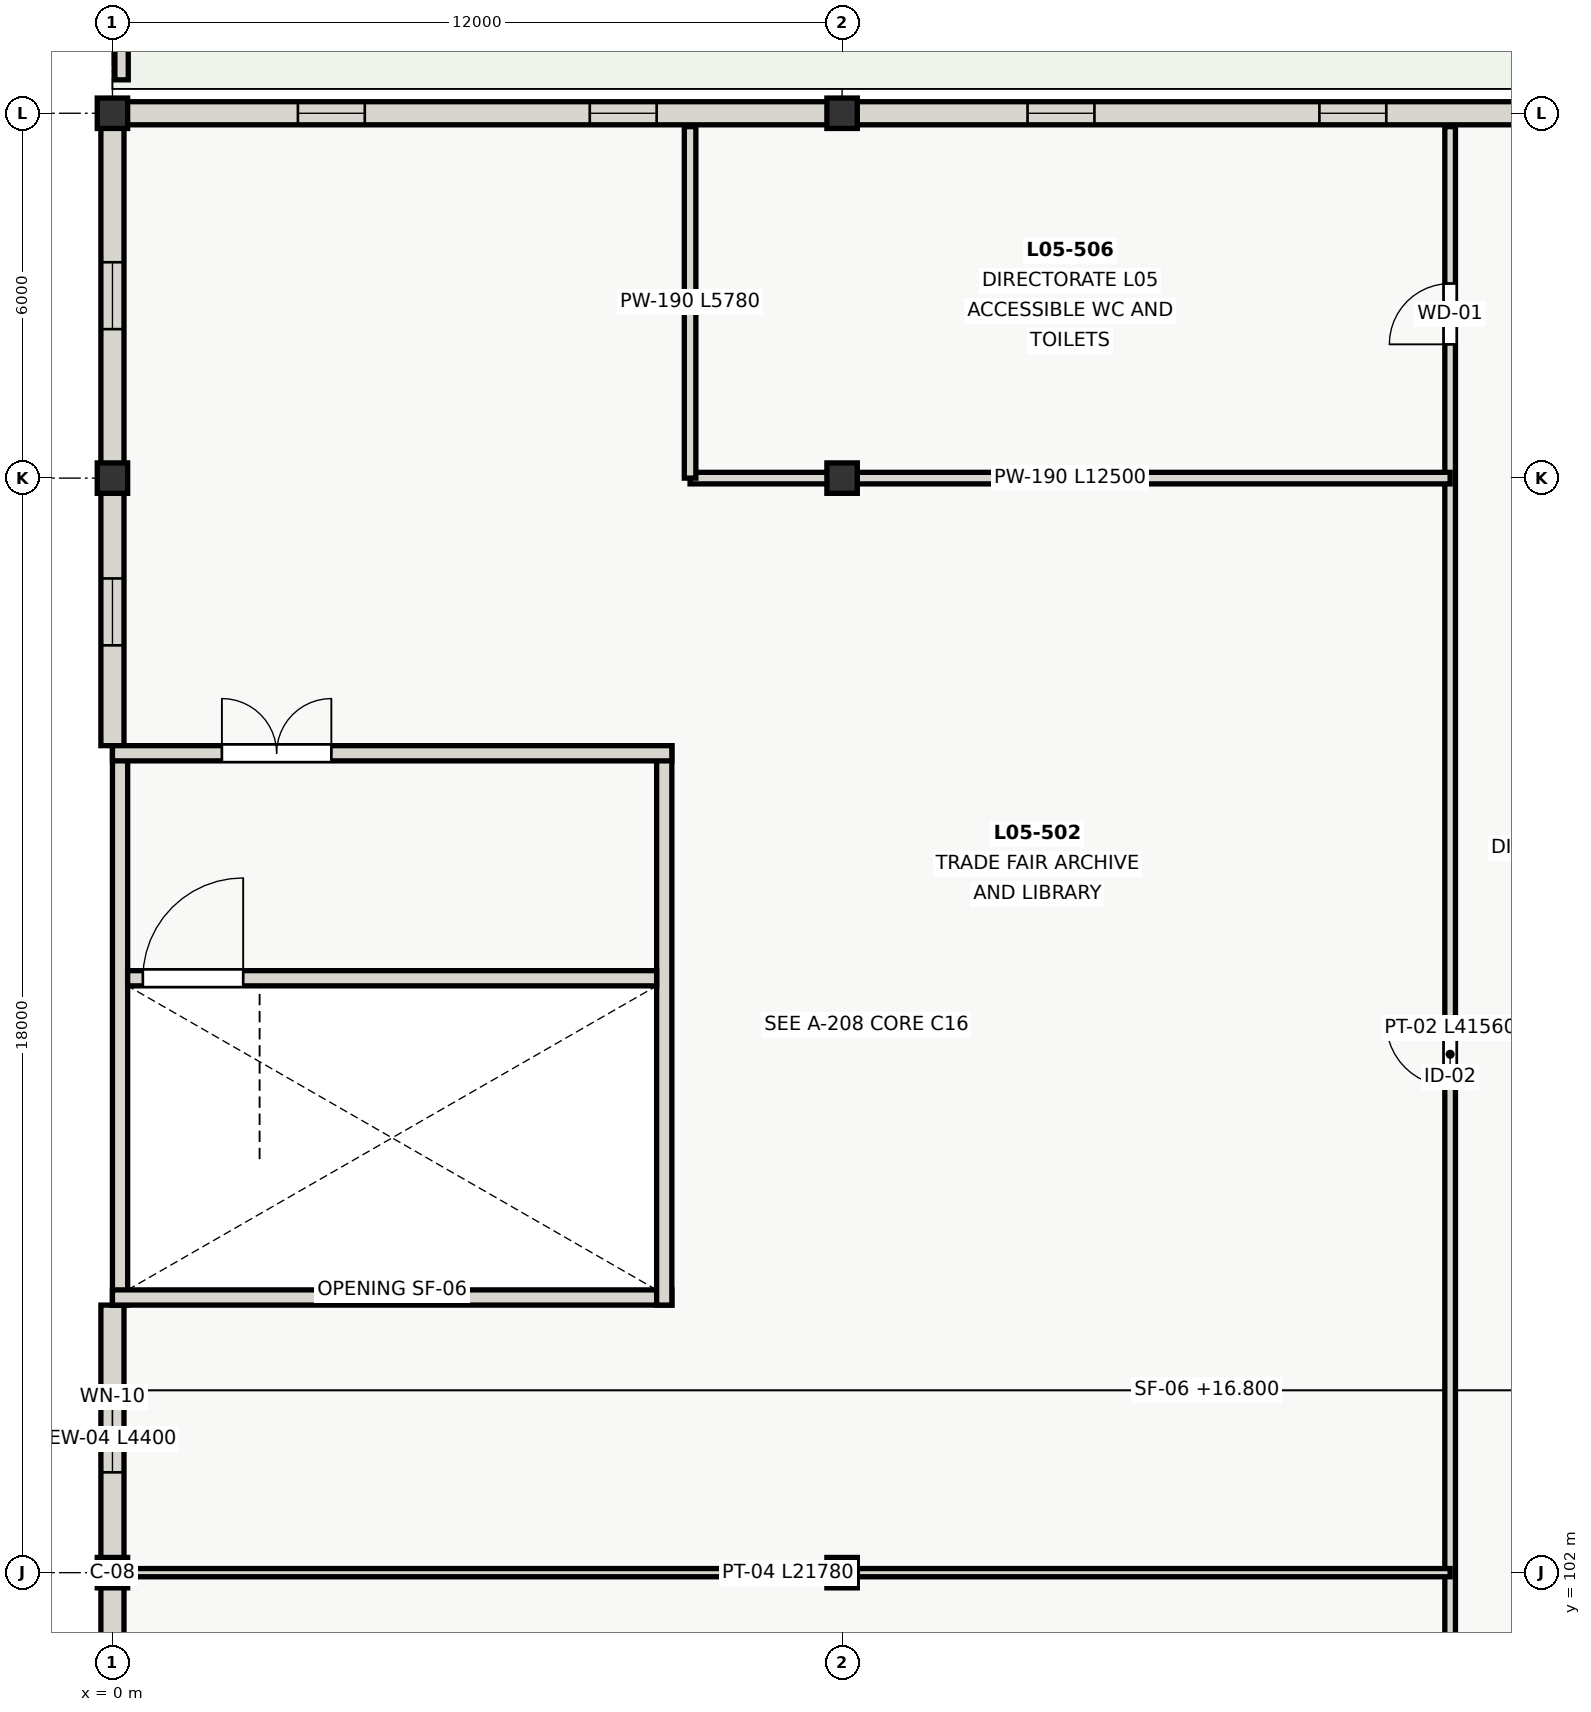
"""IFC4 building model, lengths in metres.
Left out: names, types, materials, properties, quantities, classifications, styles, units other than length and angle.
Written with IfcOpenShell. Run it as: python <this file> out.ifc"""

import sys

from ifc_helpers import new_model, si_unit, direction, frame, frame_2d, origin, origin_2d, place, context, subcontext, project, spatial, rectangle, extrude, element, fill, save


model = new_model("IFC4")
c1 = context("Model", 3, precision=1e-05, world=origin(), true_north=direction((0.0, 1.0)))
c2 = subcontext(c1, "Body", "Model", "MODEL_VIEW")
j1 = project(units=[si_unit("LENGTHUNIT", "METRE"), si_unit("PLANEANGLEUNIT", "RADIAN")], contexts=[c1])
p1 = place(None, origin())
s1 = spatial("IfcSite", under=j1, at=p1, CompositionType="ELEMENT")
p2 = place(p1, origin())
s2 = spatial("IfcBuilding", under=s1, at=p2, CompositionType="ELEMENT")
p3 = place(p2, frame((0.0, 0.0, 16.8)))
s3 = spatial("IfcBuildingStorey", under=s2, at=p3, CompositionType="ELEMENT", Elevation=16.8)
for number, where, z_axis, x_axis in (
    (1, (0.0, 102.0, 0.0), (0.0, 0.0, 1.0), (1.0, 0.0, 0.0)),
    (2, (12.0, 102.0, 0.0), (0.0, 0.0, 1.0), (1.0, 0.0, 0.0)),
    (3, (0.0, 120.0, 0.0), (0.0, 0.0, 1.0), (1.0, 0.0, 0.0)),
    (4, (12.0, 120.0, 0.0), (0.0, 0.0, 1.0), (1.0, 0.0, 0.0)),
    (5, (0.0, 126.0, 0.0), (0.0, 0.0, 1.0), (1.0, 0.0, 0.0)),
    (6, (12.0, 126.0, 0.0), (0.0, 0.0, 1.0), (1.0, 0.0, 0.0)),
):
    element("IfcColumn", number, at=place(p3, frame(where, z_axis=z_axis, x_axis=x_axis)), inside=s3, PredefinedType="COLUMN", context=c2, shape_type="SweptSolid", body=[
        extrude(rectangle(XDim=0.5, YDim=0.5, at=origin_2d()), origin(), (0.0, 0.0, 1.0), 4.2),
    ])
p4 = place(p3, frame((0.0, 97.6, 0.0), z_axis=(0.0, 0.0, 1.0), x_axis=(0.0, 1.0, 0.0)))
e7 = element("IfcWall", 7, at=p4, inside=s3, PredefinedType="SOLIDWALL", context=c2, shape_type="SweptSolid", body=[
    extrude(rectangle(XDim=4.4, YDim=0.38, at=frame_2d((2.2, 0.0))), origin(), (0.0, 0.0, 1.0), 3.525),
])
p5 = place(p4, frame((1.65, 0.0, 0.9)))
e8 = element("IfcOpeningElement", 8, at=p5, cuts=e7, PredefinedType="OPENING", context=c2, shape_type="SweptSolid", body=[
    extrude(rectangle(XDim=1.1, YDim=1.55, at=frame_2d((0.55, 0.775))), frame((0.0, 0.2, 0.0), z_axis=(0.0, -1.0, 0.0), x_axis=(1.0, 0.0, 0.0)), (0.0, 0.0, 1.0), 0.4),
])
p6 = place(p3, frame((0.0, 102.0, 0.0), z_axis=(0.0, 0.0, 1.0), x_axis=(0.0, 1.0, 0.0)))
e9 = element("IfcWall", 9, at=p6, inside=s3, PredefinedType="SOLIDWALL", context=c2, shape_type="SweptSolid", body=[
    extrude(rectangle(XDim=4.4, YDim=0.38, at=frame_2d((2.2, 0.0))), origin(), (0.0, 0.0, 1.0), 3.525),
])
p7 = place(p6, frame((1.65, 0.0, 0.9)))
e10 = element("IfcOpeningElement", 10, at=p7, cuts=e9, PredefinedType="OPENING", context=c2, shape_type="SweptSolid", body=[
    extrude(rectangle(XDim=1.1, YDim=1.55, at=frame_2d((0.55, 0.775))), frame((0.0, 0.2, 0.0), z_axis=(0.0, -1.0, 0.0), x_axis=(1.0, 0.0, 0.0)), (0.0, 0.0, 1.0), 0.4),
])
p8 = place(p3, frame((0.0, 115.6, 0.0), z_axis=(0.0, 0.0, 1.0), x_axis=(0.0, 1.0, 0.0)))
e11 = element("IfcWall", 11, at=p8, inside=s3, PredefinedType="SOLIDWALL", context=c2, shape_type="SweptSolid", body=[
    extrude(rectangle(XDim=4.4, YDim=0.38, at=frame_2d((2.2, 0.0))), origin(), (0.0, 0.0, 1.0), 3.525),
])
p9 = place(p8, frame((1.65, 0.0, 0.9)))
e12 = element("IfcOpeningElement", 12, at=p9, cuts=e11, PredefinedType="OPENING", context=c2, shape_type="SweptSolid", body=[
    extrude(rectangle(XDim=1.1, YDim=1.55, at=frame_2d((0.55, 0.775))), frame((0.0, 0.2, 0.0), z_axis=(0.0, -1.0, 0.0), x_axis=(1.0, 0.0, 0.0)), (0.0, 0.0, 1.0), 0.4),
])
p10 = place(p3, frame((0.0, 120.0, 0.0), z_axis=(0.0, 0.0, 1.0), x_axis=(0.0, 1.0, 0.0)))
e13 = element("IfcWall", 13, at=p10, inside=s3, PredefinedType="SOLIDWALL", context=c2, shape_type="SweptSolid", body=[
    extrude(rectangle(XDim=6.0, YDim=0.38, at=frame_2d((3.0, 0.0))), origin(), (0.0, 0.0, 1.0), 3.525),
])
p11 = place(p10, frame((2.45, 0.0, 0.9)))
e14 = element("IfcOpeningElement", 14, at=p11, cuts=e13, PredefinedType="OPENING", context=c2, shape_type="SweptSolid", body=[
    extrude(rectangle(XDim=1.1, YDim=1.55, at=frame_2d((0.55, 0.775))), frame((0.0, 0.2, 0.0), z_axis=(0.0, -1.0, 0.0), x_axis=(1.0, 0.0, 0.0)), (0.0, 0.0, 1.0), 0.4),
])
p12 = place(p3, frame((0.0, 126.0, 0.0), z_axis=(0.0, 0.0, 1.0), x_axis=(1.0, 0.0, 0.0)))
e15 = element("IfcWall", 15, at=p12, inside=s3, PredefinedType="SOLIDWALL", context=c2, shape_type="SweptSolid", body=[
    extrude(rectangle(XDim=12.0, YDim=0.38, at=frame_2d((6.0, 0.0))), origin(), (0.0, 0.0, 1.0), 3.555),
])
p13 = place(p12, frame((3.05, 0.0, 0.9)))
e16 = element("IfcOpeningElement", 16, at=p13, cuts=e15, PredefinedType="OPENING", context=c2, shape_type="SweptSolid", body=[
    extrude(rectangle(XDim=1.1, YDim=1.55, at=frame_2d((0.55, 0.775))), frame((0.0, 0.2, 0.0), z_axis=(0.0, -1.0, 0.0), x_axis=(1.0, 0.0, 0.0)), (0.0, 0.0, 1.0), 0.4),
])
p14 = place(p12, frame((7.85, 0.0, 0.9)))
e17 = element("IfcOpeningElement", 17, at=p14, cuts=e15, PredefinedType="OPENING", context=c2, shape_type="SweptSolid", body=[
    extrude(rectangle(XDim=1.1, YDim=1.55, at=frame_2d((0.55, 0.775))), frame((0.0, 0.2, 0.0), z_axis=(0.0, -1.0, 0.0), x_axis=(1.0, 0.0, 0.0)), (0.0, 0.0, 1.0), 0.4),
])
p15 = place(p3, frame((12.0, 126.0, 0.0), z_axis=(0.0, 0.0, 1.0), x_axis=(1.0, 0.0, 0.0)))
e18 = element("IfcWall", 18, at=p15, inside=s3, PredefinedType="SOLIDWALL", context=c2, shape_type="SweptSolid", body=[
    extrude(rectangle(XDim=12.0, YDim=0.38, at=frame_2d((6.0, 0.0))), origin(), (0.0, 0.0, 1.0), 3.555),
])
p16 = place(p15, frame((3.05, 0.0, 0.9)))
e19 = element("IfcOpeningElement", 19, at=p16, cuts=e18, PredefinedType="OPENING", context=c2, shape_type="SweptSolid", body=[
    extrude(rectangle(XDim=1.1, YDim=1.55, at=frame_2d((0.55, 0.775))), frame((0.0, 0.2, 0.0), z_axis=(0.0, -1.0, 0.0), x_axis=(1.0, 0.0, 0.0)), (0.0, 0.0, 1.0), 0.4),
])
p17 = place(p15, frame((7.85, 0.0, 0.9)))
e20 = element("IfcOpeningElement", 20, at=p17, cuts=e18, PredefinedType="OPENING", context=c2, shape_type="SweptSolid", body=[
    extrude(rectangle(XDim=1.1, YDim=1.55, at=frame_2d((0.55, 0.775))), frame((0.0, 0.2, 0.0), z_axis=(0.0, -1.0, 0.0), x_axis=(1.0, 0.0, 0.0)), (0.0, 0.0, 1.0), 0.4),
])
p18 = place(p3, frame((0.15, 126.55, 0.0), z_axis=(0.0, 0.0, 1.0), x_axis=(0.0, 1.0, 0.0)))
e21 = element("IfcWall", 21, at=p18, inside=s3, PredefinedType="PARAPET", context=c2, shape_type="SweptSolid", body=[
    extrude(rectangle(XDim=11.3, YDim=0.22, at=frame_2d((5.65, 0.0))), origin(), (0.0, 0.0, 1.0), 1.15),
])
p19 = place(p3, frame((0.125, 106.4, 0.0), z_axis=(0.0, 0.0, 1.0), x_axis=(0.0, 1.0, 0.0)))
e22 = element("IfcWall", 22, at=p19, inside=s3, PredefinedType="SHEAR", context=c2, shape_type="SweptSolid", body=[
    extrude(rectangle(XDim=9.2, YDim=0.25, at=frame_2d((4.6, 0.0))), origin(), (0.0, 0.0, 1.0), 4.2),
])
p20 = place(p3, frame((0.0, 106.525, 0.0), z_axis=(0.0, 0.0, 1.0), x_axis=(1.0, 0.0, 0.0)))
e23 = element("IfcWall", 23, at=p20, inside=s3, PredefinedType="SHEAR", context=c2, shape_type="SweptSolid", body=[
    extrude(rectangle(XDim=9.2, YDim=0.25, at=frame_2d((4.6, 0.0))), origin(), (0.0, 0.0, 1.0), 4.2),
])
p21 = place(p3, frame((9.075, 106.4, 0.0), z_axis=(0.0, 0.0, 1.0), x_axis=(0.0, 1.0, 0.0)))
e24 = element("IfcWall", 24, at=p21, inside=s3, PredefinedType="SHEAR", context=c2, shape_type="SweptSolid", body=[
    extrude(rectangle(XDim=9.2, YDim=0.25, at=frame_2d((4.6, 0.0))), origin(), (0.0, 0.0, 1.0), 4.2),
])
p22 = place(p3, frame((0.0, 115.475, 0.0), z_axis=(0.0, 0.0, 1.0), x_axis=(1.0, 0.0, 0.0)))
e25 = element("IfcWall", 25, at=p22, inside=s3, PredefinedType="SHEAR", context=c2, shape_type="SweptSolid", body=[
    extrude(rectangle(XDim=9.2, YDim=0.25, at=frame_2d((4.6, 0.0))), origin(), (0.0, 0.0, 1.0), 4.2),
])
p23 = place(p22, frame((1.8, 0.0, 0.0)))
e26 = element("IfcOpeningElement", 26, at=p23, cuts=e25, PredefinedType="OPENING", context=c2, shape_type="SweptSolid", body=[
    extrude(rectangle(XDim=1.8, YDim=2.15, at=frame_2d((0.9, 1.075))), frame((0.0, 0.135, 0.0), z_axis=(0.0, -1.0, 0.0), x_axis=(1.0, 0.0, 0.0)), (0.0, 0.0, 1.0), 0.27),
])
p24 = place(p3, frame((0.25, 111.775, 0.0), z_axis=(0.0, 0.0, 1.0), x_axis=(1.0, 0.0, 0.0)))
e27 = element("IfcWall", 27, at=p24, inside=s3, PredefinedType="SHEAR", context=c2, shape_type="SweptSolid", body=[
    extrude(rectangle(XDim=8.7, YDim=0.25, at=frame_2d((4.35, 0.0))), origin(), (0.0, 0.0, 1.0), 4.2),
])
p25 = place(p24, frame((0.25, 0.0, 0.0)))
e28 = element("IfcOpeningElement", 28, at=p25, cuts=e27, PredefinedType="OPENING", context=c2, shape_type="SweptSolid", body=[
    extrude(rectangle(XDim=1.65, YDim=2.1, at=frame_2d((0.825, 1.05))), frame((0.0, 0.135, 0.0), z_axis=(0.0, -1.0, 0.0), x_axis=(1.0, 0.0, 0.0)), (0.0, 0.0, 1.0), 0.27),
])
p26 = place(p3, frame((22.0, 84.22, 0.0), z_axis=(0.0, 0.0, 1.0), x_axis=(0.0, 1.0, 0.0)))
e29 = element("IfcWall", 29, at=p26, inside=s3, PredefinedType="PARTITIONING", context=c2, shape_type="SweptSolid", body=[
    extrude(rectangle(XDim=41.56, YDim=0.175, at=frame_2d((20.78, 0.0))), origin(), (0.0, 0.0, 1.0), 3.8),
])
p27 = place(p26, frame((1.98, 0.0, 0.0)))
e30 = element("IfcOpeningElement", 30, at=p27, cuts=e29, PredefinedType="OPENING", context=c2, shape_type="SweptSolid", body=[
    extrude(rectangle(XDim=1.05, YDim=2.1, at=frame_2d((0.525, 1.05))), frame((0.0, 0.097, 0.0), z_axis=(0.0, -1.0, 0.0), x_axis=(1.0, 0.0, 0.0)), (0.0, 0.0, 1.0), 0.195),
])
p28 = place(p26, frame((10.28, 0.0, 0.0)))
e31 = element("IfcOpeningElement", 31, at=p28, cuts=e29, PredefinedType="OPENING", context=c2, shape_type="SweptSolid", body=[
    extrude(rectangle(XDim=1.8, YDim=2.15, at=frame_2d((0.9, 1.075))), frame((0.0, 0.097, 0.0), z_axis=(0.0, -1.0, 0.0), x_axis=(1.0, 0.0, 0.0)), (0.0, 0.0, 1.0), 0.195),
])
p29 = place(p26, frame((14.58, 0.0, 0.0)))
e32 = element("IfcOpeningElement", 32, at=p29, cuts=e29, PredefinedType="OPENING", context=c2, shape_type="SweptSolid", body=[
    extrude(rectangle(XDim=1.05, YDim=2.1, at=frame_2d((0.525, 1.05))), frame((0.0, 0.097, 0.0), z_axis=(0.0, -1.0, 0.0), x_axis=(1.0, 0.0, 0.0)), (0.0, 0.0, 1.0), 0.195),
])
p30 = place(p26, frame((25.78, 0.0, 0.0)))
e33 = element("IfcOpeningElement", 33, at=p30, cuts=e29, PredefinedType="OPENING", context=c2, shape_type="SweptSolid", body=[
    extrude(rectangle(XDim=1.05, YDim=2.1, at=frame_2d((0.525, 1.05))), frame((0.0, 0.097, 0.0), z_axis=(0.0, -1.0, 0.0), x_axis=(1.0, 0.0, 0.0)), (0.0, 0.0, 1.0), 0.195),
])
p31 = place(p26, frame((37.98, 0.0, 0.0)))
e34 = element("IfcOpeningElement", 34, at=p31, cuts=e29, PredefinedType="OPENING", context=c2, shape_type="SweptSolid", body=[
    extrude(rectangle(XDim=1.0, YDim=2.1, at=frame_2d((0.5, 1.05))), frame((0.0, 0.097, 0.0), z_axis=(0.0, -1.0, 0.0), x_axis=(1.0, 0.0, 0.0)), (0.0, 0.0, 1.0), 0.195),
])
p32 = place(p3, frame((0.22, 102.0, 0.0), z_axis=(0.0, 0.0, 1.0), x_axis=(1.0, 0.0, 0.0)))
e35 = element("IfcWall", 35, at=p32, inside=s3, PredefinedType="PARTITIONING", context=c2, shape_type="SweptSolid", body=[
    extrude(rectangle(XDim=21.78, YDim=0.135, at=frame_2d((10.89, 0.0))), origin(), (0.0, 0.0, 1.0), 3.8),
])
p33 = place(p3, frame((9.5, 120.0, 0.0), z_axis=(0.0, 0.0, 1.0), x_axis=(1.0, 0.0, 0.0)))
e36 = element("IfcWall", 36, at=p33, inside=s3, PredefinedType="PLUMBINGWALL", context=c2, shape_type="SweptSolid", body=[
    extrude(rectangle(XDim=12.5, YDim=0.19, at=frame_2d((6.25, 0.0))), origin(), (0.0, 0.0, 1.0), 3.8),
])
p34 = place(p3, frame((9.5, 120.0, 0.0), z_axis=(0.0, 0.0, 1.0), x_axis=(0.0, 1.0, 0.0)))
e37 = element("IfcWall", 37, at=p34, inside=s3, PredefinedType="PLUMBINGWALL", context=c2, shape_type="SweptSolid", body=[
    extrude(rectangle(XDim=5.78, YDim=0.19, at=frame_2d((2.89, 0.0))), origin(), (0.0, 0.0, 1.0), 3.8),
])
p35 = place(p7, origin())
e38 = element("IfcWindow", 38, at=p35, inside=s3, PartitioningType="SINGLE_PANEL", PredefinedType="WINDOW", context=c2, shape_type="SweptSolid", body=[
    extrude(rectangle(XDim=1.1, YDim=1.55, at=frame_2d((0.55, 0.775))), frame((0.0, 0.03, 0.0), z_axis=(0.0, -1.0, 0.0), x_axis=(1.0, 0.0, 0.0)), (0.0, 0.0, 1.0), 0.06),
])
fill(e10, e38)
p36 = place(p9, origin())
e39 = element("IfcWindow", 39, at=p36, inside=s3, PartitioningType="SINGLE_PANEL", PredefinedType="WINDOW", context=c2, shape_type="SweptSolid", body=[
    extrude(rectangle(XDim=1.1, YDim=1.55, at=frame_2d((0.55, 0.775))), frame((0.0, 0.03, 0.0), z_axis=(0.0, -1.0, 0.0), x_axis=(1.0, 0.0, 0.0)), (0.0, 0.0, 1.0), 0.06),
])
fill(e12, e39)
p37 = place(p11, origin())
e40 = element("IfcWindow", 40, at=p37, inside=s3, PartitioningType="SINGLE_PANEL", PredefinedType="WINDOW", context=c2, shape_type="SweptSolid", body=[
    extrude(rectangle(XDim=1.1, YDim=1.55, at=frame_2d((0.55, 0.775))), frame((0.0, 0.03, 0.0), z_axis=(0.0, -1.0, 0.0), x_axis=(1.0, 0.0, 0.0)), (0.0, 0.0, 1.0), 0.06),
])
fill(e14, e40)
p38 = place(p13, origin())
e41 = element("IfcWindow", 41, at=p38, inside=s3, PartitioningType="SINGLE_PANEL", PredefinedType="WINDOW", context=c2, shape_type="SweptSolid", body=[
    extrude(rectangle(XDim=1.1, YDim=1.55, at=frame_2d((0.55, 0.775))), frame((0.0, 0.03, 0.0), z_axis=(0.0, -1.0, 0.0), x_axis=(1.0, 0.0, 0.0)), (0.0, 0.0, 1.0), 0.06),
])
fill(e16, e41)
p39 = place(p14, origin())
e42 = element("IfcWindow", 42, at=p39, inside=s3, PartitioningType="SINGLE_PANEL", PredefinedType="WINDOW", context=c2, shape_type="SweptSolid", body=[
    extrude(rectangle(XDim=1.1, YDim=1.55, at=frame_2d((0.55, 0.775))), frame((0.0, 0.03, 0.0), z_axis=(0.0, -1.0, 0.0), x_axis=(1.0, 0.0, 0.0)), (0.0, 0.0, 1.0), 0.06),
])
fill(e17, e42)
p40 = place(p16, origin())
e43 = element("IfcWindow", 43, at=p40, inside=s3, PartitioningType="SINGLE_PANEL", PredefinedType="WINDOW", context=c2, shape_type="SweptSolid", body=[
    extrude(rectangle(XDim=1.1, YDim=1.55, at=frame_2d((0.55, 0.775))), frame((0.0, 0.03, 0.0), z_axis=(0.0, -1.0, 0.0), x_axis=(1.0, 0.0, 0.0)), (0.0, 0.0, 1.0), 0.06),
])
fill(e19, e43)
p41 = place(p17, origin())
e44 = element("IfcWindow", 44, at=p41, inside=s3, PartitioningType="SINGLE_PANEL", PredefinedType="WINDOW", context=c2, shape_type="SweptSolid", body=[
    extrude(rectangle(XDim=1.1, YDim=1.55, at=frame_2d((0.55, 0.775))), frame((0.0, 0.03, 0.0), z_axis=(0.0, -1.0, 0.0), x_axis=(1.0, 0.0, 0.0)), (0.0, 0.0, 1.0), 0.06),
])
fill(e20, e44)
p42 = place(p23, origin())
e45 = element("IfcDoor", 45, at=p42, inside=s3, OperationType="DOUBLE_DOOR_SINGLE_SWING", PredefinedType="DOOR", context=c2, shape_type="SweptSolid", body=[
    extrude(rectangle(XDim=1.8, YDim=2.15, at=frame_2d((0.9, 1.075))), frame((0.0, 0.025, 0.0), z_axis=(0.0, -1.0, 0.0), x_axis=(1.0, 0.0, 0.0)), (0.0, 0.0, 1.0), 0.05),
])
fill(e26, e45)
p43 = place(p25, origin())
e46 = element("IfcDoor", 46, at=p43, inside=s3, OperationType="SINGLE_SWING_RIGHT", PredefinedType="DOOR", context=c2, shape_type="SweptSolid", body=[
    extrude(rectangle(XDim=1.65, YDim=2.1, at=frame_2d((0.825, 1.05))), frame((0.0, 0.025, 0.0), z_axis=(0.0, -1.0, 0.0), x_axis=(1.0, 0.0, 0.0)), (0.0, 0.0, 1.0), 0.05),
])
fill(e28, e46)
p44 = place(p30, origin())
e47 = element("IfcDoor", 47, at=p44, inside=s3, OperationType="SINGLE_SWING_RIGHT", PredefinedType="DOOR", context=c2, shape_type="SweptSolid", body=[
    extrude(rectangle(XDim=1.05, YDim=2.1, at=frame_2d((0.525, 1.05))), frame((0.0, 0.025, 0.0), z_axis=(0.0, -1.0, 0.0), x_axis=(1.0, 0.0, 0.0)), (0.0, 0.0, 1.0), 0.05),
])
fill(e33, e47)
p45 = place(p31, origin())
e48 = element("IfcDoor", 48, at=p45, inside=s3, OperationType="SINGLE_SWING_LEFT", PredefinedType="DOOR", context=c2, shape_type="SweptSolid", body=[
    extrude(rectangle(XDim=1.0, YDim=2.1, at=frame_2d((0.5, 1.05))), frame((0.0, 0.025, 0.0), z_axis=(0.0, -1.0, 0.0), x_axis=(1.0, 0.0, 0.0)), (0.0, 0.0, 1.0), 0.05),
])
fill(e34, e48)
save(model, sys.argv[1])
